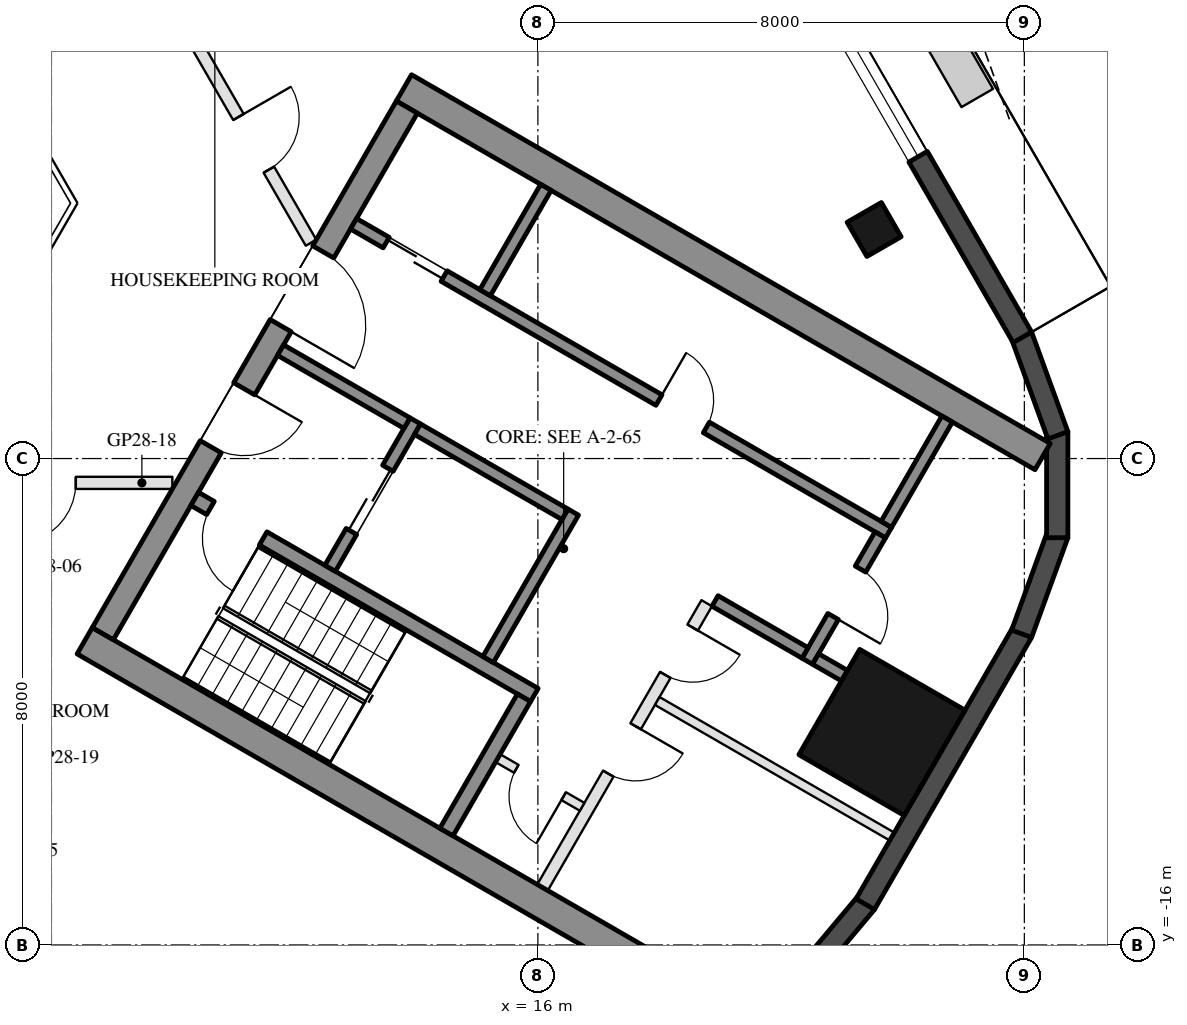
"""IFC4 building model, lengths in metres.
Left out: names, types, materials, properties, quantities, classifications, styles, units other than length and angle.
Written with IfcOpenShell. Run it as: python <this file> out.ifc"""

import sys

from ifc_helpers import new_model, si_unit, direction, frame, frame_2d, origin, origin_2d, place, context, subcontext, project, spatial, rectangle, hollow_rectangle, extrude, boolean, halfspace, element, fill, save


model = new_model("IFC4")
c1 = context("Model", 3, precision=1e-05, world=origin(), true_north=direction((0.0, 1.0)))
c2 = subcontext(c1, "Body", "Model", "MODEL_VIEW")
j1 = project(units=[si_unit("LENGTHUNIT", "METRE"), si_unit("PLANEANGLEUNIT", "RADIAN")], contexts=[c1])
p1 = place(None, origin())
s1 = spatial("IfcSite", under=j1, at=p1, CompositionType="ELEMENT")
p2 = place(p1, origin())
s2 = spatial("IfcBuilding", under=s1, at=p2, CompositionType="ELEMENT")
p3 = place(p2, frame((0.0, 0.0, 283.7)))
s3 = spatial("IfcBuildingStorey", under=s2, at=p3, CompositionType="ELEMENT", Elevation=283.7)
p4 = place(p3, frame((21.53, -4.233, 0.0), z_axis=(0.0, 0.0, 1.0), x_axis=(-0.5, 0.866025403784, 0.0)))
e1 = element("IfcColumn", 1, at=p4, inside=s3, PredefinedType="COLUMN", context=c2, shape_type="SweptSolid", body=[
    boolean("DIFFERENCE", extrude(hollow_rectangle(XDim=0.65, YDim=0.65, WallThickness=0.03, at=origin_2d()), origin(), (0.0, 0.0, 1.0), 3.7), halfspace(frame((0.0, 0.0, 3.653), z_axis=(0.0, 0.0, 1.0), x_axis=(1.0, 0.0, 0.0)), False)),
])
p5 = place(p3, frame((21.658, -12.504, 0.0), z_axis=(0.0, 0.0, 1.0), x_axis=(0.5, 0.866025403784, 0.0)))
e2 = element("IfcColumn", 2, at=p5, inside=s3, PredefinedType="COLUMN", context=c2, shape_type="SweptSolid", body=[
    boolean("DIFFERENCE", extrude(hollow_rectangle(XDim=2.0, YDim=2.0, WallThickness=0.05, at=origin_2d()), origin(), (0.0, 0.0, 1.0), 3.7), halfspace(frame((0.0, 0.0, 3.587), z_axis=(0.0, 0.0, 1.0), x_axis=(1.0, 0.0, 0.0)), False)),
])
p6 = place(p3, frame((20.28, -16.641, 0.0), z_axis=(0.0, 0.0, 1.0), x_axis=(0.642768607723, 0.766060387258, 0.0)))
e3 = element("IfcWall", 3, at=p6, inside=s3, PredefinedType="SOLIDWALL", context=c2, shape_type="SweptSolid", body=[
    extrude(rectangle(XDim=1.745, YDim=0.35, at=frame_2d((0.872, 0.0))), origin(), (0.0, 0.0, 1.0), 3.55),
])
p7 = place(p3, frame((21.384, -15.33, 0.0), z_axis=(0.0, 0.0, 1.0), x_axis=(0.500020983425, 0.866013288659, 0.0)))
e4 = element("IfcWall", 4, at=p7, inside=s3, PredefinedType="SOLIDWALL", context=c2, shape_type="SweptSolid", body=[
    extrude(rectangle(XDim=5.168, YDim=0.35, at=frame_2d((2.584, 0.0))), origin(), (0.0, 0.0, 1.0), 3.55),
])
for number, where, z_axis, x_axis in (
    (5, (23.955, -10.882, 0.0), (0.0, 0.0, 1.0), (0.342, 0.94, 0.0)),
    (6, (24.541, -9.302, 0.0), (0.0, 0.0, 1.0), (0.0, 1.0, 0.0)),
    (7, (24.552, -7.618, 0.0), (0.0, 0.0, 1.0), (-0.342, 0.94, 0.0)),
):
    element("IfcWall", number, at=place(p3, frame(where, z_axis=z_axis, x_axis=x_axis)), inside=s3, PredefinedType="SOLIDWALL", context=c2, shape_type="SweptSolid", body=[
        extrude(rectangle(XDim=1.745, YDim=0.35, at=frame_2d((0.872, 0.0))), origin(), (0.0, 0.0, 1.0), 3.55),
    ])
p8 = place(p3, frame((23.968, -6.006, 0.0), z_axis=(0.0, 0.0, 1.0), x_axis=(-0.500008899612, 0.86602026553, 0.0)))
e8 = element("IfcWall", 8, at=p8, inside=s3, PredefinedType="SOLIDWALL", context=c2, shape_type="SweptSolid", body=[
    extrude(rectangle(XDim=10.87, YDim=0.35, at=frame_2d((5.435, 0.0))), origin(), (0.0, 0.0, 1.0), 3.55),
])
p9 = place(p8, frame((6.894, 0.0, 0.0)))
e9 = element("IfcOpeningElement", 9, at=p9, cuts=e8, PredefinedType="OPENING", context=c2, shape_type="SweptSolid", body=[
    extrude(rectangle(XDim=2.4, YDim=2.4, at=frame_2d((1.2, 1.2))), frame((0.0, 0.185, 0.0), z_axis=(0.0, -1.0, 0.0), x_axis=(1.0, 0.0, 0.0)), (0.0, 0.0, 1.0), 0.37),
])
p10 = place(p8, frame((3.429, 0.0, 0.3)))
e10 = element("IfcOpeningElement", 10, at=p10, cuts=e8, PredefinedType="OPENING", context=c2, shape_type="SweptSolid", body=[
    extrude(rectangle(XDim=3.1, YDim=2.65, at=frame_2d((1.55, 1.325))), frame((0.0, 0.185, 0.0), z_axis=(0.0, -1.0, 0.0), x_axis=(1.0, 0.0, 0.0)), (0.0, 0.0, 1.0), 0.37),
])
for number, where, z_axis, x_axis in (
    (11, (8.547, -10.997, 0.0), (0.0, 0.0, 1.0), (0.866, -0.5, 0.0)),
    (12, (13.797, -1.903, 0.0), (0.0, 0.0, 1.0), (0.866, -0.5, 0.0)),
):
    element("IfcWall", number, at=place(p3, frame(where, z_axis=z_axis, x_axis=x_axis)), inside=s3, PredefinedType="SHEAR", context=c2, shape_type="SweptSolid", body=[
        extrude(rectangle(XDim=12.129, YDim=0.5, at=frame_2d((6.064, 0.0))), origin(), (0.0, 0.0, 1.0), 3.5),
    ])
p11 = place(p3, frame((8.845, -10.88, 0.0), z_axis=(0.0, 0.0, 1.0), x_axis=(0.500004234368, 0.866022959057, 0.0)))
e13 = element("IfcWall", 13, at=p11, inside=s3, PredefinedType="SHEAR", context=c2, shape_type="SweptSolid", body=[
    extrude(rectangle(XDim=10.0, YDim=0.4, at=frame_2d((5.0, 0.0))), origin(), (0.0, 0.0, 1.0), 3.5),
])
p12 = place(p11, frame((3.55, 0.0, 0.0)))
e14 = element("IfcOpeningElement", 14, at=p12, cuts=e13, PredefinedType="OPENING", context=c2, shape_type="SweptSolid", body=[
    extrude(rectangle(XDim=1.1, YDim=2.1, at=frame_2d((0.55, 1.05))), frame((0.0, 0.21, 0.0), z_axis=(0.0, -1.0, 0.0), x_axis=(1.0, 0.0, 0.0)), (0.0, 0.0, 1.0), 0.42),
])
p13 = place(p11, frame((5.85, 0.0, 0.0)))
e15 = element("IfcOpeningElement", 15, at=p13, cuts=e13, PredefinedType="OPENING", context=c2, shape_type="SweptSolid", body=[
    extrude(rectangle(XDim=1.4, YDim=2.1, at=frame_2d((0.7, 1.05))), frame((0.0, 0.21, 0.0), z_axis=(0.0, -1.0, 0.0), x_axis=(1.0, 0.0, 0.0)), (0.0, 0.0, 1.0), 0.42),
])
p14 = place(p3, frame((10.356, -8.664, 0.0), z_axis=(0.0, 0.0, 1.0), x_axis=(0.866028629588, -0.499994412703, 0.0)))
e16 = element("IfcWall", 16, at=p14, inside=s3, PredefinedType="SHEAR", context=c2, shape_type="SweptSolid", body=[
    extrude(rectangle(XDim=6.45, YDim=0.25, at=frame_2d((3.225, 0.0))), origin(), (0.0, 0.0, 1.0), 3.5),
])
p15 = place(p14, frame((0.3, 0.0, 0.0)))
e17 = element("IfcOpeningElement", 17, at=p15, cuts=e16, PredefinedType="OPENING", context=c2, shape_type="SweptSolid", body=[
    extrude(rectangle(XDim=1.0, YDim=2.1, at=frame_2d((0.5, 1.05))), frame((0.0, 0.135, 0.0), z_axis=(0.0, -1.0, 0.0), x_axis=(1.0, 0.0, 0.0)), (0.0, 0.0, 1.0), 0.27),
])
p16 = place(p3, frame((14.496, -14.143, 0.0), z_axis=(0.0, 0.0, 1.0), x_axis=(0.500062241894, 0.865989465428, 0.0)))
e18 = element("IfcWall", 18, at=p16, inside=s3, PredefinedType="SHEAR", context=c2, shape_type="SweptSolid", body=[
    extrude(rectangle(XDim=2.55, YDim=0.25, at=frame_2d((1.275, 0.0))), origin(), (0.0, 0.0, 1.0), 3.5),
])
p17 = place(p3, frame((15.181, -11.305, 0.0), z_axis=(0.0, 0.0, 1.0), x_axis=(0.49994636267, 0.866056369097, 0.0)))
e19 = element("IfcWall", 19, at=p17, inside=s3, PredefinedType="SHEAR", context=c2, shape_type="SweptSolid", body=[
    extrude(rectangle(XDim=2.8, YDim=0.2, at=frame_2d((1.4, 0.0))), origin(), (0.0, 0.0, 1.0), 3.5),
])
p18 = place(p3, frame((12.583, -9.805, 0.0), z_axis=(0.0, 0.0, 1.0), x_axis=(0.49994636267, 0.866056369097, 0.0)))
e20 = element("IfcWall", 20, at=p18, inside=s3, PredefinedType="SHEAR", context=c2, shape_type="SweptSolid", body=[
    extrude(rectangle(XDim=2.8, YDim=0.2, at=frame_2d((1.4, 0.0))), origin(), (0.0, 0.0, 1.0), 3.5),
])
p19 = place(p18, frame((0.7, 0.0, 0.0)))
e21 = element("IfcOpeningElement", 21, at=p19, cuts=e20, PredefinedType="OPENING", context=c2, shape_type="SweptSolid", body=[
    extrude(rectangle(XDim=1.2, YDim=2.1, at=frame_2d((0.6, 1.05))), frame((0.0, 0.11, 0.0), z_axis=(0.0, -1.0, 0.0), x_axis=(1.0, 0.0, 0.0)), (0.0, 0.0, 1.0), 0.22),
])
p20 = place(p3, frame((11.768, -6.217, 0.0), z_axis=(0.0, 0.0, 1.0), x_axis=(0.866050077142, -0.499957262057, 0.0)))
e22 = element("IfcWall", 22, at=p20, inside=s3, PredefinedType="SHEAR", context=c2, shape_type="SweptSolid", body=[
    extrude(rectangle(XDim=2.4, YDim=0.2, at=frame_2d((1.2, 0.0))), origin(), (0.0, 0.0, 1.0), 3.5),
])
p21 = place(p3, frame((14.02, -7.517, 0.0), z_axis=(0.0, 0.0, 1.0), x_axis=(0.866034573852, -0.49998411664, 0.0)))
e23 = element("IfcWall", 23, at=p21, inside=s3, PredefinedType="SHEAR", context=c2, shape_type="SweptSolid", body=[
    extrude(rectangle(XDim=2.8, YDim=0.2, at=frame_2d((1.4, 0.0))), origin(), (0.0, 0.0, 1.0), 3.5),
])
p22 = place(p3, frame((12.968, -4.138, 0.0), z_axis=(0.0, 0.0, 1.0), x_axis=(0.866028328073, -0.49999493495, 0.0)))
e24 = element("IfcWall", 24, at=p22, inside=s3, PredefinedType="SHEAR", context=c2, shape_type="SweptSolid", body=[
    extrude(rectangle(XDim=10.16, YDim=0.2, at=frame_2d((5.08, 0.0))), origin(), (0.0, 0.0, 1.0), 3.5),
])
p23 = place(p22, frame((0.62, 0.0, 0.0)))
e25 = element("IfcOpeningElement", 25, at=p23, cuts=e24, PredefinedType="OPENING", context=c2, shape_type="SweptSolid", body=[
    extrude(rectangle(XDim=1.1, YDim=2.1, at=frame_2d((0.55, 1.05))), frame((0.0, 0.11, 0.0), z_axis=(0.0, -1.0, 0.0), x_axis=(1.0, 0.0, 0.0)), (0.0, 0.0, 1.0), 0.22),
])
p24 = place(p22, frame((5.8, 0.0, 0.0)))
e26 = element("IfcOpeningElement", 26, at=p24, cuts=e24, PredefinedType="OPENING", context=c2, shape_type="SweptSolid", body=[
    extrude(rectangle(XDim=0.9, YDim=2.1, at=frame_2d((0.45, 1.05))), frame((0.0, 0.11, 0.0), z_axis=(0.0, -1.0, 0.0), x_axis=(1.0, 0.0, 0.0)), (0.0, 0.0, 1.0), 0.22),
])
p25 = place(p3, frame((20.43, -11.333, 0.0), z_axis=(0.0, 0.0, 1.0), x_axis=(0.500001309137, 0.866024647952, 0.0)))
e27 = element("IfcWall", 27, at=p25, inside=s3, PredefinedType="SHEAR", context=c2, shape_type="SweptSolid", body=[
    extrude(rectangle(XDim=2.4, YDim=0.2, at=frame_2d((1.2, 0.0))), origin(), (0.0, 0.0, 1.0), 3.5),
])
p26 = place(p25, frame((0.85, 0.0, 0.0)))
e28 = element("IfcOpeningElement", 28, at=p26, cuts=e27, PredefinedType="OPENING", context=c2, shape_type="SweptSolid", body=[
    extrude(rectangle(XDim=0.9, YDim=2.1, at=frame_2d((0.45, 1.05))), frame((0.0, 0.11, 0.0), z_axis=(0.0, -1.0, 0.0), x_axis=(1.0, 0.0, 0.0)), (0.0, 0.0, 1.0), 0.22),
])
p27 = place(p3, frame((18.913, -10.342, 0.0), z_axis=(0.0, 0.0, 1.0), x_axis=(0.866038183914, -0.499977863513, 0.0)))
e29 = element("IfcWall", 29, at=p27, inside=s3, PredefinedType="SHEAR", context=c2, shape_type="SweptSolid", body=[
    extrude(rectangle(XDim=1.71, YDim=0.2, at=frame_2d((0.855, 0.0))), origin(), (0.0, 0.0, 1.0), 3.5),
])
for number, where, z_axis, x_axis in (
    (30, (15.131, -5.272, 0.0), (0.0, 0.0, 1.0), (0.5, 0.866, 0.0)),
    (31, (21.73, -9.082, 0.0), (0.0, 0.0, 1.0), (0.5, 0.866, 0.0)),
):
    element("IfcWall", number, at=place(p3, frame(where, z_axis=z_axis, x_axis=x_axis)), inside=s3, PredefinedType="SHEAR", context=c2, shape_type="SweptSolid", body=[
        extrude(rectangle(XDim=2.0, YDim=0.2, at=frame_2d((1.0, 0.0))), origin(), (0.0, 0.0, 1.0), 3.5),
    ])
p28 = place(p3, frame((20.567, -11.297, 0.0), z_axis=(0.0, 0.0, 1.0), x_axis=(0.866237429803, -0.49963258021, 0.0)))
e32 = element("IfcWall", 32, at=p28, inside=s3, PredefinedType="SHEAR", context=c2, shape_type="SweptSolid", body=[
    extrude(rectangle(XDim=0.549, YDim=0.2, at=frame_2d((0.274, 0.0))), origin(), (0.0, 0.0, 1.0), 3.5),
])
p29 = place(p3, frame((16.076, -15.055, 0.0), z_axis=(0.0, 0.0, 1.0), x_axis=(0.499995103361, 0.866028230842, 0.0)))
e33 = element("IfcWall", 33, at=p29, inside=s3, PredefinedType="PARTITIONING", context=c2, shape_type="SweptSolid", body=[
    extrude(rectangle(XDim=5.4, YDim=0.2, at=frame_2d((2.7, 0.0))), origin(), (0.0, 0.0, 1.0), 3.5),
])
p30 = place(p29, frame((2.163, 0.0, 0.0)))
e34 = element("IfcOpeningElement", 34, at=p30, cuts=e33, PredefinedType="OPENING", context=c2, shape_type="SweptSolid", body=[
    extrude(rectangle(XDim=0.9, YDim=2.1, at=frame_2d((0.45, 1.05))), frame((0.0, 0.11, 0.0), z_axis=(0.0, -1.0, 0.0), x_axis=(1.0, 0.0, 0.0)), (0.0, 0.0, 1.0), 0.22),
])
p31 = place(p29, frame((4.038, 0.0, 0.0)))
e35 = element("IfcOpeningElement", 35, at=p31, cuts=e33, PredefinedType="OPENING", context=c2, shape_type="SweptSolid", body=[
    extrude(rectangle(XDim=0.9, YDim=2.1, at=frame_2d((0.45, 1.05))), frame((0.0, 0.11, 0.0), z_axis=(0.0, -1.0, 0.0), x_axis=(1.0, 0.0, 0.0)), (0.0, 0.0, 1.0), 0.22),
])
p32 = place(p3, frame((15.342, -12.928, 0.0), z_axis=(0.0, 0.0, 1.0), x_axis=(0.865989903783, -0.500061482766, 0.0)))
e36 = element("IfcWall", 36, at=p32, inside=s3, PredefinedType="PARTITIONING", context=c2, shape_type="SweptSolid", body=[
    extrude(rectangle(XDim=1.6, YDim=0.15, at=frame_2d((0.8, 0.0))), origin(), (0.0, 0.0, 1.0), 3.5),
])
p33 = place(p32, frame((0.35, 0.0, 0.0)))
e37 = element("IfcOpeningElement", 37, at=p33, cuts=e36, PredefinedType="OPENING", context=c2, shape_type="SweptSolid", body=[
    extrude(rectangle(XDim=0.9, YDim=2.1, at=frame_2d((0.45, 1.05))), frame((0.0, 0.085, 0.0), z_axis=(0.0, -1.0, 0.0), x_axis=(1.0, 0.0, 0.0)), (0.0, 0.0, 1.0), 0.17),
])
p34 = place(p3, frame((17.963, -11.987, 0.0), z_axis=(0.0, 0.0, 1.0), x_axis=(0.866010510293, -0.500025795397, 0.0)))
e38 = element("IfcWall", 38, at=p34, inside=s3, PredefinedType="PARTITIONING", context=c2, shape_type="SweptSolid", body=[
    extrude(rectangle(XDim=4.459, YDim=0.15, at=frame_2d((2.229, 0.0))), origin(), (0.0, 0.0, 1.0), 3.5),
])
p35 = place(p3, frame((9.988, -8.4, 0.0), z_axis=(0.0, 0.0, 1.0), x_axis=(-1.0, 0.0, 0.0)))
e39 = element("IfcWall", 39, at=p35, inside=s3, PredefinedType="PARTITIONING", context=c2, shape_type="SweptSolid", body=[
    extrude(rectangle(XDim=4.175, YDim=0.2, at=frame_2d((2.087, 0.0))), origin(), (0.0, 0.0, 1.0), 3.05),
])
p36 = place(p35, frame((1.587, 0.0, 0.0)))
e40 = element("IfcOpeningElement", 40, at=p36, cuts=e39, PredefinedType="OPENING", context=c2, shape_type="SweptSolid", body=[
    extrude(rectangle(XDim=1.0, YDim=2.1, at=frame_2d((0.5, 1.05))), frame((0.0, 0.11, 0.0), z_axis=(0.0, -1.0, 0.0), x_axis=(1.0, 0.0, 0.0)), (0.0, 0.0, 1.0), 0.22),
])
p37 = place(p3, frame((10.382, -1.182, 0.0), z_axis=(0.0, 0.0, 1.0), x_axis=(0.50002859319, -0.866008894869, 0.0)))
e41 = element("IfcWall", 41, at=p37, inside=s3, PredefinedType="PARTITIONING", context=c2, shape_type="SweptSolid", body=[
    extrude(rectangle(XDim=3.774, YDim=0.2, at=frame_2d((1.887, 0.0))), origin(), (0.0, 0.0, 1.0), 3.05),
])
p38 = place(p37, frame((1.387, 0.0, 0.0)))
e42 = element("IfcOpeningElement", 42, at=p38, cuts=e41, PredefinedType="OPENING", context=c2, shape_type="SweptSolid", body=[
    extrude(rectangle(XDim=1.0, YDim=2.1, at=frame_2d((0.5, 1.05))), frame((0.0, 0.11, 0.0), z_axis=(0.0, -1.0, 0.0), x_axis=(1.0, 0.0, 0.0)), (0.0, 0.0, 1.0), 0.22),
])
p39 = place(p10, origin())
e43 = element("IfcWindow", 43, at=p39, inside=s3, PartitioningType="SINGLE_PANEL", PredefinedType="WINDOW", context=c2, shape_type="SweptSolid", body=[
    extrude(rectangle(XDim=3.1, YDim=2.65, at=frame_2d((1.55, 1.325))), frame((0.0, 0.03, 0.0), z_axis=(0.0, -1.0, 0.0), x_axis=(1.0, 0.0, 0.0)), (0.0, 0.0, 1.0), 0.06),
])
fill(e10, e43)
p40 = place(p19, origin())
e44 = element("IfcDoor", 44, at=p40, inside=s3, OperationType="DOUBLE_DOOR_SLIDING", PredefinedType="DOOR", context=c2, shape_type="SweptSolid", body=[
    extrude(rectangle(XDim=1.2, YDim=2.1, at=frame_2d((0.6, 1.05))), frame((0.0, 0.025, 0.0), z_axis=(0.0, -1.0, 0.0), x_axis=(1.0, 0.0, 0.0)), (0.0, 0.0, 1.0), 0.05),
])
fill(e21, e44)
p41 = place(p33, frame((0.9, 0.0, 0.0), z_axis=(0.0, 0.0, 1.0), x_axis=(-1.0, 0.0, 0.0)))
e45 = element("IfcDoor", 45, at=p41, inside=s3, OperationType="SINGLE_SWING_LEFT", PredefinedType="DOOR", context=c2, shape_type="SweptSolid", body=[
    extrude(rectangle(XDim=0.9, YDim=2.1, at=frame_2d((0.45, 1.05))), frame((0.0, 0.025, 0.0), z_axis=(0.0, -1.0, 0.0), x_axis=(1.0, 0.0, 0.0)), (0.0, 0.0, 1.0), 0.05),
])
fill(e37, e45)
p42 = place(p23, origin())
e46 = element("IfcDoor", 46, at=p42, inside=s3, OperationType="DOUBLE_DOOR_SLIDING", PredefinedType="DOOR", context=c2, shape_type="SweptSolid", body=[
    extrude(rectangle(XDim=1.1, YDim=2.1, at=frame_2d((0.55, 1.05))), frame((0.0, 0.025, 0.0), z_axis=(0.0, -1.0, 0.0), x_axis=(1.0, 0.0, 0.0)), (0.0, 0.0, 1.0), 0.05),
])
fill(e25, e46)
p43 = place(p24, origin())
e47 = element("IfcDoor", 47, at=p43, inside=s3, OperationType="SINGLE_SWING_LEFT", PredefinedType="DOOR", context=c2, shape_type="SweptSolid", body=[
    extrude(rectangle(XDim=0.9, YDim=2.1, at=frame_2d((0.45, 1.05))), frame((0.0, 0.025, 0.0), z_axis=(0.0, -1.0, 0.0), x_axis=(1.0, 0.0, 0.0)), (0.0, 0.0, 1.0), 0.05),
])
fill(e26, e47)
p44 = place(p26, frame((0.9, 0.0, 0.0), z_axis=(0.0, 0.0, 1.0), x_axis=(-1.0, 0.0, 0.0)))
e48 = element("IfcDoor", 48, at=p44, inside=s3, OperationType="SINGLE_SWING_RIGHT", PredefinedType="DOOR", context=c2, shape_type="SweptSolid", body=[
    extrude(rectangle(XDim=0.9, YDim=2.1, at=frame_2d((0.45, 1.05))), frame((0.0, 0.025, 0.0), z_axis=(0.0, -1.0, 0.0), x_axis=(1.0, 0.0, 0.0)), (0.0, 0.0, 1.0), 0.05),
])
fill(e28, e48)
p45 = place(p30, frame((0.9, 0.0, 0.0), z_axis=(0.0, 0.0, 1.0), x_axis=(-1.0, 0.0, 0.0)))
e49 = element("IfcDoor", 49, at=p45, inside=s3, OperationType="SINGLE_SWING_LEFT", PredefinedType="DOOR", context=c2, shape_type="SweptSolid", body=[
    extrude(rectangle(XDim=0.9, YDim=2.1, at=frame_2d((0.45, 1.05))), frame((0.0, 0.025, 0.0), z_axis=(0.0, -1.0, 0.0), x_axis=(1.0, 0.0, 0.0)), (0.0, 0.0, 1.0), 0.05),
])
fill(e34, e49)
p46 = place(p31, frame((0.9, 0.0, 0.0), z_axis=(0.0, 0.0, 1.0), x_axis=(-1.0, 0.0, 0.0)))
e50 = element("IfcDoor", 50, at=p46, inside=s3, OperationType="SINGLE_SWING_LEFT", PredefinedType="DOOR", context=c2, shape_type="SweptSolid", body=[
    extrude(rectangle(XDim=0.9, YDim=2.1, at=frame_2d((0.45, 1.05))), frame((0.0, 0.025, 0.0), z_axis=(0.0, -1.0, 0.0), x_axis=(1.0, 0.0, 0.0)), (0.0, 0.0, 1.0), 0.05),
])
fill(e35, e50)
p47 = place(p12, frame((1.1, 0.0, 0.0), z_axis=(0.0, 0.0, 1.0), x_axis=(-1.0, 0.0, 0.0)))
e51 = element("IfcDoor", 51, at=p47, inside=s3, OperationType="SINGLE_SWING_LEFT", PredefinedType="DOOR", context=c2, shape_type="SweptSolid", body=[
    extrude(rectangle(XDim=1.1, YDim=2.1, at=frame_2d((0.55, 1.05))), frame((0.0, 0.025, 0.0), z_axis=(0.0, -1.0, 0.0), x_axis=(1.0, 0.0, 0.0)), (0.0, 0.0, 1.0), 0.05),
])
fill(e14, e51)
p48 = place(p13, frame((1.4, 0.0, 0.0), z_axis=(0.0, 0.0, 1.0), x_axis=(-1.0, 0.0, 0.0)))
e52 = element("IfcDoor", 52, at=p48, inside=s3, OperationType="DOUBLE_DOOR_SINGLE_SWING", PredefinedType="DOOR", context=c2, shape_type="SweptSolid", body=[
    extrude(rectangle(XDim=1.4, YDim=2.1, at=frame_2d((0.7, 1.05))), frame((0.0, 0.025, 0.0), z_axis=(0.0, -1.0, 0.0), x_axis=(1.0, 0.0, 0.0)), (0.0, 0.0, 1.0), 0.05),
])
fill(e15, e52)
p49 = place(p15, frame((1.0, 0.0, 0.0), z_axis=(0.0, 0.0, 1.0), x_axis=(-1.0, 0.0, 0.0)))
e53 = element("IfcDoor", 53, at=p49, inside=s3, OperationType="SINGLE_SWING_LEFT", PredefinedType="DOOR", context=c2, shape_type="SweptSolid", body=[
    extrude(rectangle(XDim=1.0, YDim=2.1, at=frame_2d((0.5, 1.05))), frame((0.0, 0.025, 0.0), z_axis=(0.0, -1.0, 0.0), x_axis=(1.0, 0.0, 0.0)), (0.0, 0.0, 1.0), 0.05),
])
fill(e17, e53)
p50 = place(p36, origin())
e54 = element("IfcDoor", 54, at=p50, inside=s3, OperationType="SINGLE_SWING_RIGHT", PredefinedType="DOOR", context=c2, shape_type="SweptSolid", body=[
    extrude(rectangle(XDim=1.0, YDim=2.1, at=frame_2d((0.5, 1.05))), frame((0.0, 0.025, 0.0), z_axis=(0.0, -1.0, 0.0), x_axis=(1.0, 0.0, 0.0)), (0.0, 0.0, 1.0), 0.05),
])
fill(e40, e54)
p51 = place(p38, origin())
e55 = element("IfcDoor", 55, at=p51, inside=s3, OperationType="SINGLE_SWING_LEFT", PredefinedType="DOOR", context=c2, shape_type="SweptSolid", body=[
    extrude(rectangle(XDim=1.0, YDim=2.1, at=frame_2d((0.5, 1.05))), frame((0.0, 0.025, 0.0), z_axis=(0.0, -1.0, 0.0), x_axis=(1.0, 0.0, 0.0)), (0.0, 0.0, 1.0), 0.05),
])
fill(e42, e55)
save(model, sys.argv[1])
